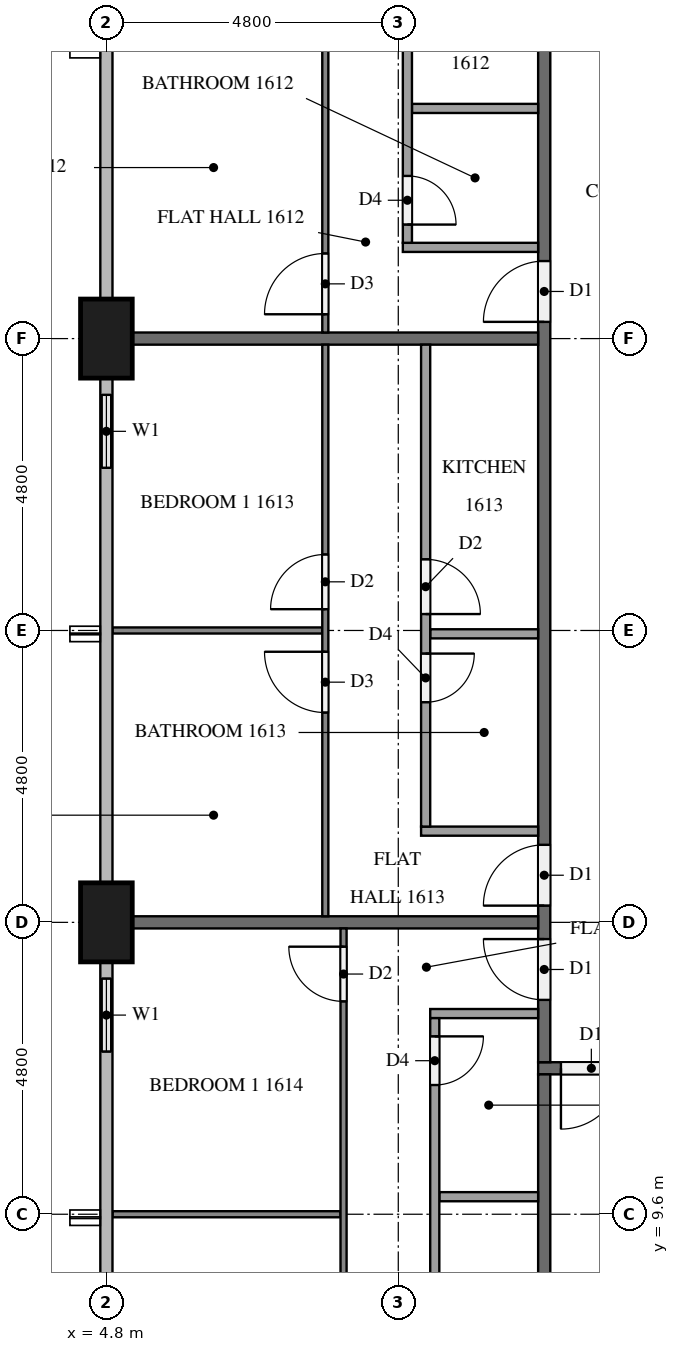
"""IFC4 building model, lengths in metres.
Left out: names, types, materials, properties, quantities, classifications, styles, units other than length and angle.
Written with IfcOpenShell. Run it as: python <this file> out.ifc"""

import sys

from ifc_helpers import new_model, si_unit, direction, frame, frame_2d, origin, origin_2d, place, context, subcontext, project, spatial, rectangle, extrude, element, fill, save


model = new_model("IFC4")
c1 = context("Model", 3, precision=1e-05, world=origin(), true_north=direction((0.0, 1.0)))
c2 = subcontext(c1, "Body", "Model", "MODEL_VIEW")
j1 = project(units=[si_unit("LENGTHUNIT", "METRE"), si_unit("PLANEANGLEUNIT", "RADIAN")], contexts=[c1])
p1 = place(None, origin())
s1 = spatial("IfcSite", under=j1, at=p1, CompositionType="ELEMENT")
p2 = place(p1, origin())
s2 = spatial("IfcBuilding", under=s1, at=p2, CompositionType="ELEMENT")
p3 = place(p2, frame((0.0, 0.0, 66.3)))
s3 = spatial("IfcBuildingStorey", under=s2, at=p3, CompositionType="ELEMENT", Elevation=66.3)
for number, where, z_axis, x_axis in (
    (1, (4.8, 24.0, 0.0), (0.0, 0.0, 1.0), (0.0, 1.0, 0.0)),
    (2, (4.8, 14.4, 0.0), (0.0, 0.0, 1.0), (0.0, 1.0, 0.0)),
):
    element("IfcColumn", number, at=place(p3, frame(where, z_axis=z_axis, x_axis=x_axis)), inside=s3, PredefinedType="COLUMN", context=c2, shape_type="SweptSolid", body=[
        extrude(rectangle(XDim=1.3, YDim=0.85, at=origin_2d()), origin(), (0.0, 0.0, 1.0), 3.2),
    ])
p4 = place(p3, frame((4.8, 23.35, 0.0), z_axis=(0.0, 0.0, 1.0), x_axis=(0.0, -1.0, 0.0)))
e3 = element("IfcWall", 3, at=p4, inside=s3, PredefinedType="SOLIDWALL", context=c2, shape_type="SweptSolid", body=[
    extrude(rectangle(XDim=1.75, YDim=0.15, at=frame_2d((0.875, 0.0))), origin(), (0.0, 0.0, 1.0), 3.2),
])
p5 = place(p4, frame((0.275, 0.0, 0.9)))
e4 = element("IfcOpeningElement", 4, at=p5, cuts=e3, PredefinedType="OPENING", context=c2, shape_type="SweptSolid", body=[
    extrude(rectangle(XDim=1.2, YDim=1.4, at=frame_2d((0.6, 0.7))), frame((0.0, 0.085, 0.0), z_axis=(0.0, -1.0, 0.0), x_axis=(1.0, 0.0, 0.0)), (0.0, 0.0, 1.0), 0.17),
])
p6 = place(p3, frame((4.8, 13.75, 0.0), z_axis=(0.0, 0.0, 1.0), x_axis=(0.0, -1.0, 0.0)))
e5 = element("IfcWall", 5, at=p6, inside=s3, PredefinedType="SOLIDWALL", context=c2, shape_type="SweptSolid", body=[
    extrude(rectangle(XDim=1.75, YDim=0.15, at=frame_2d((0.875, 0.0))), origin(), (0.0, 0.0, 1.0), 3.2),
])
p7 = place(p6, frame((0.275, 0.0, 0.9)))
e6 = element("IfcOpeningElement", 6, at=p7, cuts=e5, PredefinedType="OPENING", context=c2, shape_type="SweptSolid", body=[
    extrude(rectangle(XDim=1.2, YDim=1.4, at=frame_2d((0.6, 0.7))), frame((0.0, 0.085, 0.0), z_axis=(0.0, -1.0, 0.0), x_axis=(1.0, 0.0, 0.0)), (0.0, 0.0, 1.0), 0.17),
])
p8 = place(p3, frame((50.5, 12.0, 0.0), z_axis=(0.0, 0.0, 1.0), x_axis=(-1.0, 0.0, 0.0)))
e7 = element("IfcWall", 7, at=p8, inside=s3, PredefinedType="PARTITIONING", context=c2, shape_type="SweptSolid", body=[
    extrude(rectangle(XDim=38.6, YDim=0.2, at=frame_2d((19.3, 0.0))), origin(), (0.0, 0.0, 1.0), 3.2),
])
p9 = place(p8, frame((37.225, 0.0, 0.0)))
e8 = element("IfcOpeningElement", 8, at=p9, cuts=e7, PredefinedType="OPENING", context=c2, shape_type="SweptSolid", body=[
    extrude(rectangle(XDim=1.0, YDim=2.1, at=frame_2d((0.5, 1.05))), frame((0.0, 0.11, 0.0), z_axis=(0.0, -1.0, 0.0), x_axis=(1.0, 0.0, 0.0)), (0.0, 0.0, 1.0), 0.22),
])
p10 = place(p8, frame((22.825, 0.0, 0.0)))
e9 = element("IfcOpeningElement", 9, at=p10, cuts=e7, PredefinedType="OPENING", context=c2, shape_type="SweptSolid", body=[
    extrude(rectangle(XDim=1.0, YDim=2.1, at=frame_2d((0.5, 1.05))), frame((0.0, 0.11, 0.0), z_axis=(0.0, -1.0, 0.0), x_axis=(1.0, 0.0, 0.0)), (0.0, 0.0, 1.0), 0.22),
])
p11 = place(p8, frame((0.375, 0.0, 0.0)))
e10 = element("IfcOpeningElement", 10, at=p11, cuts=e7, PredefinedType="OPENING", context=c2, shape_type="SweptSolid", body=[
    extrude(rectangle(XDim=1.0, YDim=2.1, at=frame_2d((0.5, 1.05))), frame((0.0, 0.11, 0.0), z_axis=(0.0, -1.0, 0.0), x_axis=(1.0, 0.0, 0.0)), (0.0, 0.0, 1.0), 0.22),
])
p12 = place(p3, frame((12.0, 12.1, 0.0), z_axis=(0.0, 0.0, 1.0), x_axis=(0.0, 1.0, 0.0)))
e11 = element("IfcWall", 11, at=p12, inside=s3, PredefinedType="PARTITIONING", context=c2, shape_type="SweptSolid", body=[
    extrude(rectangle(XDim=28.6, YDim=0.2, at=frame_2d((14.3, 0.0))), origin(), (0.0, 0.0, 1.0), 3.2),
])
p13 = place(p12, frame((19.375, 0.0, 0.0)))
e12 = element("IfcOpeningElement", 12, at=p13, cuts=e11, PredefinedType="OPENING", context=c2, shape_type="SweptSolid", body=[
    extrude(rectangle(XDim=1.0, YDim=2.1, at=frame_2d((0.5, 1.05))), frame((0.0, 0.11, 0.0), z_axis=(0.0, -1.0, 0.0), x_axis=(1.0, 0.0, 0.0)), (0.0, 0.0, 1.0), 0.22),
])
p14 = place(p12, frame((12.175, 0.0, 0.0)))
e13 = element("IfcOpeningElement", 13, at=p14, cuts=e11, PredefinedType="OPENING", context=c2, shape_type="SweptSolid", body=[
    extrude(rectangle(XDim=1.0, YDim=2.1, at=frame_2d((0.5, 1.05))), frame((0.0, 0.11, 0.0), z_axis=(0.0, -1.0, 0.0), x_axis=(1.0, 0.0, 0.0)), (0.0, 0.0, 1.0), 0.22),
])
p15 = place(p12, frame((2.575, 0.0, 0.0)))
e14 = element("IfcOpeningElement", 14, at=p15, cuts=e11, PredefinedType="OPENING", context=c2, shape_type="SweptSolid", body=[
    extrude(rectangle(XDim=1.0, YDim=2.1, at=frame_2d((0.5, 1.05))), frame((0.0, 0.11, 0.0), z_axis=(0.0, -1.0, 0.0), x_axis=(1.0, 0.0, 0.0)), (0.0, 0.0, 1.0), 0.22),
])
p16 = place(p12, frame((1.025, 0.0, 0.0)))
e15 = element("IfcOpeningElement", 15, at=p16, cuts=e11, PredefinedType="OPENING", context=c2, shape_type="SweptSolid", body=[
    extrude(rectangle(XDim=1.0, YDim=2.1, at=frame_2d((0.5, 1.05))), frame((0.0, 0.11, 0.0), z_axis=(0.0, -1.0, 0.0), x_axis=(1.0, 0.0, 0.0)), (0.0, 0.0, 1.0), 0.22),
])
p17 = place(p3, frame((12.0, 0.1, 0.0), z_axis=(0.0, 0.0, 1.0), x_axis=(0.0, 1.0, 0.0)))
e16 = element("IfcWall", 16, at=p17, inside=s3, PredefinedType="PARTITIONING", context=c2, shape_type="SweptSolid", body=[
    extrude(rectangle(XDim=11.8, YDim=0.2, at=frame_2d((5.9, 0.0))), origin(), (0.0, 0.0, 1.0), 3.2),
])
for number, where, z_axis, x_axis in (
    (17, (5.225, 24.0, 0.0), (0.0, 0.0, 1.0), (1.0, 0.0, 0.0)),
    (18, (5.225, 14.4, 0.0), (0.0, 0.0, 1.0), (1.0, 0.0, 0.0)),
):
    element("IfcWall", number, at=place(p3, frame(where, z_axis=z_axis, x_axis=x_axis)), inside=s3, PredefinedType="PARTITIONING", context=c2, shape_type="SweptSolid", body=[
        extrude(rectangle(XDim=6.675, YDim=0.2, at=frame_2d((3.337, 0.0))), origin(), (0.0, 0.0, 1.0), 3.2),
    ])
p18 = place(p3, frame((8.4, 24.1, 0.0), z_axis=(0.0, 0.0, 1.0), x_axis=(0.0, 1.0, 0.0)))
e19 = element("IfcWall", 19, at=p18, inside=s3, PredefinedType="PARTITIONING", context=c2, shape_type="SweptSolid", body=[
    extrude(rectangle(XDim=7.0, YDim=0.1, at=frame_2d((3.5, 0.0))), origin(), (0.0, 0.0, 1.0), 3.2),
])
p19 = place(p18, frame((0.3, 0.0, 0.0)))
e20 = element("IfcOpeningElement", 20, at=p19, cuts=e19, PredefinedType="OPENING", context=c2, shape_type="SweptSolid", body=[
    extrude(rectangle(XDim=1.0, YDim=2.1, at=frame_2d((0.5, 1.05))), frame((0.0, 0.06, 0.0), z_axis=(0.0, -1.0, 0.0), x_axis=(1.0, 0.0, 0.0)), (0.0, 0.0, 1.0), 0.12),
])
p20 = place(p3, frame((11.9, 27.785, 0.0), z_axis=(0.0, 0.0, 1.0), x_axis=(-1.0, 0.0, 0.0)))
e21 = element("IfcWall", 21, at=p20, inside=s3, PredefinedType="PARTITIONING", context=c2, shape_type="SweptSolid", body=[
    extrude(rectangle(XDim=2.075, YDim=0.15, at=frame_2d((1.038, 0.0))), origin(), (0.0, 0.0, 1.0), 3.2),
])
p21 = place(p3, frame((11.9, 25.5, 0.0), z_axis=(0.0, 0.0, 1.0), x_axis=(-1.0, 0.0, 0.0)))
e22 = element("IfcWall", 22, at=p21, inside=s3, PredefinedType="PARTITIONING", context=c2, shape_type="SweptSolid", body=[
    extrude(rectangle(XDim=2.225, YDim=0.15, at=frame_2d((1.112, 0.0))), origin(), (0.0, 0.0, 1.0), 3.2),
])
p22 = place(p3, frame((9.75, 31.1, 0.0), z_axis=(0.0, 0.0, 1.0), x_axis=(0.0, -1.0, 0.0)))
e23 = element("IfcWall", 23, at=p22, inside=s3, PredefinedType="PARTITIONING", context=c2, shape_type="SweptSolid", body=[
    extrude(rectangle(XDim=5.525, YDim=0.15, at=frame_2d((2.763, 0.0))), origin(), (0.0, 0.0, 1.0), 3.2),
])
p23 = place(p22, frame((4.425, 0.0, 0.0)))
e24 = element("IfcOpeningElement", 24, at=p23, cuts=e23, PredefinedType="OPENING", context=c2, shape_type="SweptSolid", body=[
    extrude(rectangle(XDim=0.8, YDim=2.1, at=frame_2d((0.4, 1.05))), frame((0.0, 0.085, 0.0), z_axis=(0.0, -1.0, 0.0), x_axis=(1.0, 0.0, 0.0)), (0.0, 0.0, 1.0), 0.17),
])
p24 = place(p22, frame((0.35, 0.0, 0.0)))
e25 = element("IfcOpeningElement", 25, at=p24, cuts=e23, PredefinedType="OPENING", context=c2, shape_type="SweptSolid", body=[
    extrude(rectangle(XDim=0.9, YDim=2.1, at=frame_2d((0.45, 1.05))), frame((0.0, 0.085, 0.0), z_axis=(0.0, -1.0, 0.0), x_axis=(1.0, 0.0, 0.0)), (0.0, 0.0, 1.0), 0.17),
])
p25 = place(p3, frame((8.35, 19.2, 0.0), z_axis=(0.0, 0.0, 1.0), x_axis=(-1.0, 0.0, 0.0)))
e26 = element("IfcWall", 26, at=p25, inside=s3, PredefinedType="PARTITIONING", context=c2, shape_type="SweptSolid", body=[
    extrude(rectangle(XDim=3.45, YDim=0.1, at=frame_2d((1.725, 0.0))), origin(), (0.0, 0.0, 1.0), 3.2),
])
p26 = place(p3, frame((8.4, 14.5, 0.0), z_axis=(0.0, 0.0, 1.0), x_axis=(0.0, 1.0, 0.0)))
e27 = element("IfcWall", 27, at=p26, inside=s3, PredefinedType="PARTITIONING", context=c2, shape_type="SweptSolid", body=[
    extrude(rectangle(XDim=9.4, YDim=0.1, at=frame_2d((4.7, 0.0))), origin(), (0.0, 0.0, 1.0), 3.2),
])
p27 = place(p26, frame((3.35, 0.0, 0.0)))
e28 = element("IfcOpeningElement", 28, at=p27, cuts=e27, PredefinedType="OPENING", context=c2, shape_type="SweptSolid", body=[
    extrude(rectangle(XDim=1.0, YDim=2.1, at=frame_2d((0.5, 1.05))), frame((0.0, 0.06, 0.0), z_axis=(0.0, -1.0, 0.0), x_axis=(1.0, 0.0, 0.0)), (0.0, 0.0, 1.0), 0.12),
])
p28 = place(p26, frame((5.05, 0.0, 0.0)))
e29 = element("IfcOpeningElement", 29, at=p28, cuts=e27, PredefinedType="OPENING", context=c2, shape_type="SweptSolid", body=[
    extrude(rectangle(XDim=0.9, YDim=2.1, at=frame_2d((0.45, 1.05))), frame((0.0, 0.06, 0.0), z_axis=(0.0, -1.0, 0.0), x_axis=(1.0, 0.0, 0.0)), (0.0, 0.0, 1.0), 0.12),
])
p29 = place(p3, frame((11.9, 19.145, 0.0), z_axis=(0.0, 0.0, 1.0), x_axis=(-1.0, 0.0, 0.0)))
e30 = element("IfcWall", 30, at=p29, inside=s3, PredefinedType="PARTITIONING", context=c2, shape_type="SweptSolid", body=[
    extrude(rectangle(XDim=1.775, YDim=0.15, at=frame_2d((0.887, 0.0))), origin(), (0.0, 0.0, 1.0), 3.2),
])
p30 = place(p3, frame((11.9, 15.9, 0.0), z_axis=(0.0, 0.0, 1.0), x_axis=(-1.0, 0.0, 0.0)))
e31 = element("IfcWall", 31, at=p30, inside=s3, PredefinedType="PARTITIONING", context=c2, shape_type="SweptSolid", body=[
    extrude(rectangle(XDim=1.925, YDim=0.15, at=frame_2d((0.962, 0.0))), origin(), (0.0, 0.0, 1.0), 3.2),
])
p31 = place(p3, frame((10.05, 23.9, 0.0), z_axis=(0.0, 0.0, 1.0), x_axis=(0.0, -1.0, 0.0)))
e32 = element("IfcWall", 32, at=p31, inside=s3, PredefinedType="PARTITIONING", context=c2, shape_type="SweptSolid", body=[
    extrude(rectangle(XDim=7.925, YDim=0.15, at=frame_2d((3.962, 0.0))), origin(), (0.0, 0.0, 1.0), 3.2),
])
p32 = place(p31, frame((5.08, 0.0, 0.0)))
e33 = element("IfcOpeningElement", 33, at=p32, cuts=e32, PredefinedType="OPENING", context=c2, shape_type="SweptSolid", body=[
    extrude(rectangle(XDim=0.8, YDim=2.1, at=frame_2d((0.4, 1.05))), frame((0.0, 0.085, 0.0), z_axis=(0.0, -1.0, 0.0), x_axis=(1.0, 0.0, 0.0)), (0.0, 0.0, 1.0), 0.17),
])
p33 = place(p31, frame((3.53, 0.0, 0.0)))
e34 = element("IfcOpeningElement", 34, at=p33, cuts=e32, PredefinedType="OPENING", context=c2, shape_type="SweptSolid", body=[
    extrude(rectangle(XDim=0.9, YDim=2.1, at=frame_2d((0.45, 1.05))), frame((0.0, 0.085, 0.0), z_axis=(0.0, -1.0, 0.0), x_axis=(1.0, 0.0, 0.0)), (0.0, 0.0, 1.0), 0.17),
])
p34 = place(p3, frame((8.65, 9.6, 0.0), z_axis=(0.0, 0.0, 1.0), x_axis=(-1.0, 0.0, 0.0)))
e35 = element("IfcWall", 35, at=p34, inside=s3, PredefinedType="PARTITIONING", context=c2, shape_type="SweptSolid", body=[
    extrude(rectangle(XDim=3.75, YDim=0.1, at=frame_2d((1.875, 0.0))), origin(), (0.0, 0.0, 1.0), 3.2),
])
p35 = place(p3, frame((8.7, 0.341, 0.0), z_axis=(0.0, 0.0, 1.0), x_axis=(0.0, 1.0, 0.0)))
e36 = element("IfcWall", 36, at=p35, inside=s3, PredefinedType="PARTITIONING", context=c2, shape_type="SweptSolid", body=[
    extrude(rectangle(XDim=13.959, YDim=0.1, at=frame_2d((6.979, 0.0))), origin(), (0.0, 0.0, 1.0), 3.2),
])
p36 = place(p35, frame((12.759, 0.0, 0.0)))
e37 = element("IfcOpeningElement", 37, at=p36, cuts=e36, PredefinedType="OPENING", context=c2, shape_type="SweptSolid", body=[
    extrude(rectangle(XDim=0.9, YDim=2.1, at=frame_2d((0.45, 1.05))), frame((0.0, 0.06, 0.0), z_axis=(0.0, -1.0, 0.0), x_axis=(1.0, 0.0, 0.0)), (0.0, 0.0, 1.0), 0.12),
])
p37 = place(p35, frame((4.809, 0.0, 0.0)))
e38 = element("IfcOpeningElement", 38, at=p37, cuts=e36, PredefinedType="OPENING", context=c2, shape_type="SweptSolid", body=[
    extrude(rectangle(XDim=1.0, YDim=2.1, at=frame_2d((0.5, 1.05))), frame((0.0, 0.06, 0.0), z_axis=(0.0, -1.0, 0.0), x_axis=(1.0, 0.0, 0.0)), (0.0, 0.0, 1.0), 0.12),
])
p38 = place(p35, frame((3.209, 0.0, 0.0)))
e39 = element("IfcOpeningElement", 39, at=p38, cuts=e36, PredefinedType="OPENING", context=c2, shape_type="SweptSolid", body=[
    extrude(rectangle(XDim=0.9, YDim=2.1, at=frame_2d((0.45, 1.05))), frame((0.0, 0.06, 0.0), z_axis=(0.0, -1.0, 0.0), x_axis=(1.0, 0.0, 0.0)), (0.0, 0.0, 1.0), 0.12),
])
p39 = place(p3, frame((11.9, 9.888, 0.0), z_axis=(0.0, 0.0, 1.0), x_axis=(-1.0, 0.0, 0.0)))
e40 = element("IfcWall", 40, at=p39, inside=s3, PredefinedType="PARTITIONING", context=c2, shape_type="SweptSolid", body=[
    extrude(rectangle(XDim=1.625, YDim=0.15, at=frame_2d((0.812, 0.0))), origin(), (0.0, 0.0, 1.0), 3.2),
])
p40 = place(p3, frame((11.9, 12.9, 0.0), z_axis=(0.0, 0.0, 1.0), x_axis=(-1.0, 0.0, 0.0)))
e41 = element("IfcWall", 41, at=p40, inside=s3, PredefinedType="PARTITIONING", context=c2, shape_type="SweptSolid", body=[
    extrude(rectangle(XDim=1.775, YDim=0.15, at=frame_2d((0.887, 0.0))), origin(), (0.0, 0.0, 1.0), 3.2),
])
p41 = place(p3, frame((10.2, 12.825, 0.0), z_axis=(0.0, 0.0, 1.0), x_axis=(0.0, -1.0, 0.0)))
e42 = element("IfcWall", 42, at=p41, inside=s3, PredefinedType="PARTITIONING", context=c2, shape_type="SweptSolid", body=[
    extrude(rectangle(XDim=12.25, YDim=0.15, at=frame_2d((6.125, 0.0))), origin(), (0.0, 0.0, 1.0), 3.2),
])
p42 = place(p41, frame((0.3, 0.0, 0.0)))
e43 = element("IfcOpeningElement", 43, at=p42, cuts=e42, PredefinedType="OPENING", context=c2, shape_type="SweptSolid", body=[
    extrude(rectangle(XDim=0.8, YDim=2.1, at=frame_2d((0.4, 1.05))), frame((0.0, 0.085, 0.0), z_axis=(0.0, -1.0, 0.0), x_axis=(1.0, 0.0, 0.0)), (0.0, 0.0, 1.0), 0.17),
])
p43 = place(p41, frame((7.585, 0.0, 0.0)))
e44 = element("IfcOpeningElement", 44, at=p43, cuts=e42, PredefinedType="OPENING", context=c2, shape_type="SweptSolid", body=[
    extrude(rectangle(XDim=0.9, YDim=2.1, at=frame_2d((0.45, 1.05))), frame((0.0, 0.085, 0.0), z_axis=(0.0, -1.0, 0.0), x_axis=(1.0, 0.0, 0.0)), (0.0, 0.0, 1.0), 0.17),
])
p44 = place(p41, frame((9.135, 0.0, 0.0)))
e45 = element("IfcOpeningElement", 45, at=p44, cuts=e42, PredefinedType="OPENING", context=c2, shape_type="SweptSolid", body=[
    extrude(rectangle(XDim=0.9, YDim=2.1, at=frame_2d((0.45, 1.05))), frame((0.0, 0.085, 0.0), z_axis=(0.0, -1.0, 0.0), x_axis=(1.0, 0.0, 0.0)), (0.0, 0.0, 1.0), 0.17),
])
p45 = place(p5, origin())
e46 = element("IfcWindow", 46, at=p45, inside=s3, PartitioningType="SINGLE_PANEL", PredefinedType="WINDOW", context=c2, shape_type="SweptSolid", body=[
    extrude(rectangle(XDim=1.2, YDim=1.4, at=frame_2d((0.6, 0.7))), frame((0.0, 0.03, 0.0), z_axis=(0.0, -1.0, 0.0), x_axis=(1.0, 0.0, 0.0)), (0.0, 0.0, 1.0), 0.06),
])
fill(e4, e46)
p46 = place(p7, origin())
e47 = element("IfcWindow", 47, at=p46, inside=s3, PartitioningType="SINGLE_PANEL", PredefinedType="WINDOW", context=c2, shape_type="SweptSolid", body=[
    extrude(rectangle(XDim=1.2, YDim=1.4, at=frame_2d((0.6, 0.7))), frame((0.0, 0.03, 0.0), z_axis=(0.0, -1.0, 0.0), x_axis=(1.0, 0.0, 0.0)), (0.0, 0.0, 1.0), 0.06),
])
fill(e6, e47)
p47 = place(p9, origin())
e48 = element("IfcDoor", 48, at=p47, inside=s3, OperationType="SINGLE_SWING_RIGHT", PredefinedType="DOOR", context=c2, shape_type="SweptSolid", body=[
    extrude(rectangle(XDim=1.0, YDim=2.1, at=frame_2d((0.5, 1.05))), frame((0.0, 0.025, 0.0), z_axis=(0.0, -1.0, 0.0), x_axis=(1.0, 0.0, 0.0)), (0.0, 0.0, 1.0), 0.05),
])
fill(e8, e48)
p48 = place(p14, origin())
e49 = element("IfcDoor", 49, at=p48, inside=s3, OperationType="SINGLE_SWING_LEFT", PredefinedType="DOOR", context=c2, shape_type="SweptSolid", body=[
    extrude(rectangle(XDim=1.0, YDim=2.1, at=frame_2d((0.5, 1.05))), frame((0.0, 0.025, 0.0), z_axis=(0.0, -1.0, 0.0), x_axis=(1.0, 0.0, 0.0)), (0.0, 0.0, 1.0), 0.05),
])
fill(e13, e49)
p49 = place(p15, origin())
e50 = element("IfcDoor", 50, at=p49, inside=s3, OperationType="SINGLE_SWING_LEFT", PredefinedType="DOOR", context=c2, shape_type="SweptSolid", body=[
    extrude(rectangle(XDim=1.0, YDim=2.1, at=frame_2d((0.5, 1.05))), frame((0.0, 0.025, 0.0), z_axis=(0.0, -1.0, 0.0), x_axis=(1.0, 0.0, 0.0)), (0.0, 0.0, 1.0), 0.05),
])
fill(e14, e50)
p50 = place(p16, origin())
e51 = element("IfcDoor", 51, at=p50, inside=s3, OperationType="SINGLE_SWING_RIGHT", PredefinedType="DOOR", context=c2, shape_type="SweptSolid", body=[
    extrude(rectangle(XDim=1.0, YDim=2.1, at=frame_2d((0.5, 1.05))), frame((0.0, 0.025, 0.0), z_axis=(0.0, -1.0, 0.0), x_axis=(1.0, 0.0, 0.0)), (0.0, 0.0, 1.0), 0.05),
])
fill(e15, e51)
p51 = place(p19, origin())
e52 = element("IfcDoor", 52, at=p51, inside=s3, OperationType="SINGLE_SWING_LEFT", PredefinedType="DOOR", context=c2, shape_type="SweptSolid", body=[
    extrude(rectangle(XDim=1.0, YDim=2.1, at=frame_2d((0.5, 1.05))), frame((0.0, 0.025, 0.0), z_axis=(0.0, -1.0, 0.0), x_axis=(1.0, 0.0, 0.0)), (0.0, 0.0, 1.0), 0.05),
])
fill(e20, e52)
p52 = place(p23, origin())
e53 = element("IfcDoor", 53, at=p52, inside=s3, OperationType="SINGLE_SWING_RIGHT", PredefinedType="DOOR", context=c2, shape_type="SweptSolid", body=[
    extrude(rectangle(XDim=0.8, YDim=2.1, at=frame_2d((0.4, 1.05))), frame((0.0, 0.025, 0.0), z_axis=(0.0, -1.0, 0.0), x_axis=(1.0, 0.0, 0.0)), (0.0, 0.0, 1.0), 0.05),
])
fill(e24, e53)
p53 = place(p27, origin())
e54 = element("IfcDoor", 54, at=p53, inside=s3, OperationType="SINGLE_SWING_RIGHT", PredefinedType="DOOR", context=c2, shape_type="SweptSolid", body=[
    extrude(rectangle(XDim=1.0, YDim=2.1, at=frame_2d((0.5, 1.05))), frame((0.0, 0.025, 0.0), z_axis=(0.0, -1.0, 0.0), x_axis=(1.0, 0.0, 0.0)), (0.0, 0.0, 1.0), 0.05),
])
fill(e28, e54)
p54 = place(p28, origin())
e55 = element("IfcDoor", 55, at=p54, inside=s3, OperationType="SINGLE_SWING_LEFT", PredefinedType="DOOR", context=c2, shape_type="SweptSolid", body=[
    extrude(rectangle(XDim=0.9, YDim=2.1, at=frame_2d((0.45, 1.05))), frame((0.0, 0.025, 0.0), z_axis=(0.0, -1.0, 0.0), x_axis=(1.0, 0.0, 0.0)), (0.0, 0.0, 1.0), 0.05),
])
fill(e29, e55)
p55 = place(p32, origin())
e56 = element("IfcDoor", 56, at=p55, inside=s3, OperationType="SINGLE_SWING_LEFT", PredefinedType="DOOR", context=c2, shape_type="SweptSolid", body=[
    extrude(rectangle(XDim=0.8, YDim=2.1, at=frame_2d((0.4, 1.05))), frame((0.0, 0.025, 0.0), z_axis=(0.0, -1.0, 0.0), x_axis=(1.0, 0.0, 0.0)), (0.0, 0.0, 1.0), 0.05),
])
fill(e33, e56)
p56 = place(p33, origin())
e57 = element("IfcDoor", 57, at=p56, inside=s3, OperationType="SINGLE_SWING_RIGHT", PredefinedType="DOOR", context=c2, shape_type="SweptSolid", body=[
    extrude(rectangle(XDim=0.9, YDim=2.1, at=frame_2d((0.45, 1.05))), frame((0.0, 0.025, 0.0), z_axis=(0.0, -1.0, 0.0), x_axis=(1.0, 0.0, 0.0)), (0.0, 0.0, 1.0), 0.05),
])
fill(e34, e57)
p57 = place(p36, origin())
e58 = element("IfcDoor", 58, at=p57, inside=s3, OperationType="SINGLE_SWING_RIGHT", PredefinedType="DOOR", context=c2, shape_type="SweptSolid", body=[
    extrude(rectangle(XDim=0.9, YDim=2.1, at=frame_2d((0.45, 1.05))), frame((0.0, 0.025, 0.0), z_axis=(0.0, -1.0, 0.0), x_axis=(1.0, 0.0, 0.0)), (0.0, 0.0, 1.0), 0.05),
])
fill(e37, e58)
p58 = place(p42, origin())
e59 = element("IfcDoor", 59, at=p58, inside=s3, OperationType="SINGLE_SWING_LEFT", PredefinedType="DOOR", context=c2, shape_type="SweptSolid", body=[
    extrude(rectangle(XDim=0.8, YDim=2.1, at=frame_2d((0.4, 1.05))), frame((0.0, 0.025, 0.0), z_axis=(0.0, -1.0, 0.0), x_axis=(1.0, 0.0, 0.0)), (0.0, 0.0, 1.0), 0.05),
])
fill(e43, e59)
save(model, sys.argv[1])
